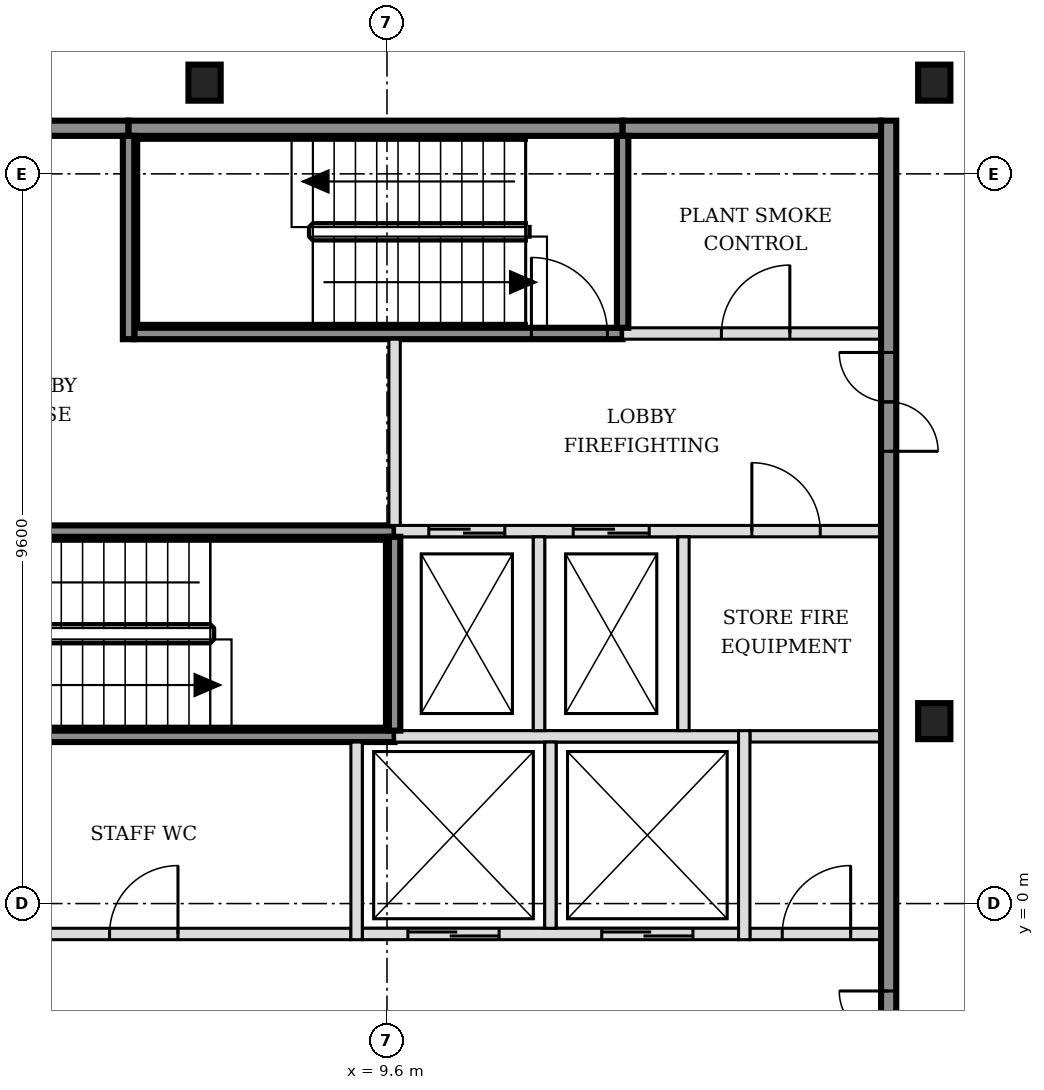
"""IFC4 building model, lengths in metres.
Left out: names, types, materials, properties, quantities, classifications, styles, units other than length and angle.
Written with IfcOpenShell. Run it as: python <this file> out.ifc"""

import sys

from ifc_helpers import new_model, si_unit, direction, frame, frame_2d, origin, origin_2d, place, context, subcontext, project, spatial, rectangle, i_section, extrude, element, fill, save


model = new_model("IFC4")
c1 = context("Model", 3, precision=1e-05, world=origin(), true_north=direction((0.0, 1.0)))
c2 = subcontext(c1, "Body", "Model", "MODEL_VIEW")
j1 = project(units=[si_unit("LENGTHUNIT", "METRE"), si_unit("PLANEANGLEUNIT", "RADIAN")], contexts=[c1])
p1 = place(None, origin())
s1 = spatial("IfcSite", under=j1, at=p1, CompositionType="ELEMENT")
p2 = place(p1, origin())
s2 = spatial("IfcBuilding", under=s1, at=p2, CompositionType="ELEMENT")
p3 = place(p2, frame((0.0, 0.0, 136.2)))
s3 = spatial("IfcBuildingStorey", under=s2, at=p3, CompositionType="ELEMENT", Elevation=136.2)
for number, where, z_axis, x_axis in (
    (1, (16.8, 2.4, -0.15), (0.0, 0.0, 1.0), (1.0, 0.0, 0.0)),
    (2, (7.2, 10.8, -0.15), (0.0, 0.0, 1.0), (1.0, 0.0, 0.0)),
    (3, (16.8, 10.8, -0.15), (0.0, 0.0, 1.0), (1.0, 0.0, 0.0)),
):
    element("IfcColumn", number, at=place(p3, frame(where, z_axis=z_axis, x_axis=x_axis)), inside=s3, PredefinedType="COLUMN", context=c2, shape_type="SweptSolid", body=[
        extrude(i_section(OverallWidth=0.424, OverallDepth=0.474, WebThickness=0.048, FlangeThickness=0.077, FilletRadius=0.015, at=origin_2d()), origin(), (0.0, 0.0, 1.0), 3.6),
    ])
p4 = place(p3, frame((-1.7, -0.4, 0.0), z_axis=(0.0, 0.0, 1.0), x_axis=(1.0, 0.0, 0.0)))
e4 = element("IfcWall", 4, at=p4, inside=s3, PredefinedType="PARTITIONING", context=c2, shape_type="SweptSolid", body=[
    extrude(rectangle(XDim=10.825, YDim=0.15, at=frame_2d((5.413, 0.0))), origin(), (0.0, 0.0, 1.0), 3.45),
])
p5 = place(p4, frame((2.15, 0.0, 0.0)))
e5 = element("IfcOpeningElement", 5, at=p5, cuts=e4, PredefinedType="OPENING", context=c2, shape_type="SweptSolid", body=[
    extrude(rectangle(XDim=0.9, YDim=2.1, at=frame_2d((0.45, 1.05))), frame((0.0, 0.085, 0.0), z_axis=(0.0, -1.0, 0.0), x_axis=(1.0, 0.0, 0.0)), (0.0, 0.0, 1.0), 0.17),
])
p6 = place(p4, frame((7.65, 0.0, 0.0)))
e6 = element("IfcOpeningElement", 6, at=p6, cuts=e4, PredefinedType="OPENING", context=c2, shape_type="SweptSolid", body=[
    extrude(rectangle(XDim=0.9, YDim=2.1, at=frame_2d((0.45, 1.05))), frame((0.0, 0.085, 0.0), z_axis=(0.0, -1.0, 0.0), x_axis=(1.0, 0.0, 0.0)), (0.0, 0.0, 1.0), 0.17),
])
p7 = place(p3, frame((9.275, -0.4, 0.0), z_axis=(0.0, 0.0, 1.0), x_axis=(1.0, 0.0, 0.0)))
e7 = element("IfcWall", 7, at=p7, inside=s3, PredefinedType="SOLIDWALL", context=c2, shape_type="SweptSolid", body=[
    extrude(rectangle(XDim=4.95, YDim=0.15, at=frame_2d((2.475, 0.0))), origin(), (0.0, 0.0, 1.0), 3.45),
])
p8 = place(p7, frame((0.6, 0.0, 0.0)))
e8 = element("IfcOpeningElement", 8, at=p8, cuts=e7, PredefinedType="OPENING", context=c2, shape_type="SweptSolid", body=[
    extrude(rectangle(XDim=1.2, YDim=2.1, at=frame_2d((0.6, 1.05))), frame((0.0, 0.085, 0.0), z_axis=(0.0, -1.0, 0.0), x_axis=(1.0, 0.0, 0.0)), (0.0, 0.0, 1.0), 0.17),
])
p9 = place(p7, frame((3.15, 0.0, 0.0)))
e9 = element("IfcOpeningElement", 9, at=p9, cuts=e7, PredefinedType="OPENING", context=c2, shape_type="SweptSolid", body=[
    extrude(rectangle(XDim=1.2, YDim=2.1, at=frame_2d((0.6, 1.05))), frame((0.0, 0.085, 0.0), z_axis=(0.0, -1.0, 0.0), x_axis=(1.0, 0.0, 0.0)), (0.0, 0.0, 1.0), 0.17),
])
p10 = place(p3, frame((14.375, -0.4, 0.0), z_axis=(0.0, 0.0, 1.0), x_axis=(1.0, 0.0, 0.0)))
e10 = element("IfcWall", 10, at=p10, inside=s3, PredefinedType="PARTITIONING", context=c2, shape_type="SweptSolid", body=[
    extrude(rectangle(XDim=1.725, YDim=0.15, at=frame_2d((0.863, 0.0))), origin(), (0.0, 0.0, 1.0), 3.45),
])
p11 = place(p10, frame((0.425, 0.0, 0.0)))
e11 = element("IfcOpeningElement", 11, at=p11, cuts=e10, PredefinedType="OPENING", context=c2, shape_type="SweptSolid", body=[
    extrude(rectangle(XDim=0.9, YDim=2.1, at=frame_2d((0.45, 1.05))), frame((0.0, 0.085, 0.0), z_axis=(0.0, -1.0, 0.0), x_axis=(1.0, 0.0, 0.0)), (0.0, 0.0, 1.0), 0.17),
])
p12 = place(p3, frame((3.2, 2.2, 0.0), z_axis=(0.0, 0.0, 1.0), x_axis=(1.0, 0.0, 0.0)))
e12 = element("IfcWall", 12, at=p12, inside=s3, PredefinedType="SOLIDWALL", context=c2, shape_type="SweptSolid", body=[
    extrude(rectangle(XDim=6.5, YDim=0.15, at=frame_2d((3.25, 0.0))), origin(), (0.0, 0.0, 1.0), 3.45),
])
p13 = place(p3, frame((9.7, 2.2, 0.0), z_axis=(0.0, 0.0, 1.0), x_axis=(1.0, 0.0, 0.0)))
e13 = element("IfcWall", 13, at=p13, inside=s3, PredefinedType="SOLIDWALL", context=c2, shape_type="SweptSolid", body=[
    extrude(rectangle(XDim=4.525, YDim=0.15, at=frame_2d((2.263, 0.0))), origin(), (0.0, 0.0, 1.0), 3.45),
])
p14 = place(p3, frame((14.375, 2.2, 0.0), z_axis=(0.0, 0.0, 1.0), x_axis=(1.0, 0.0, 0.0)))
e14 = element("IfcWall", 14, at=p14, inside=s3, PredefinedType="PARTITIONING", context=c2, shape_type="SweptSolid", body=[
    extrude(rectangle(XDim=1.725, YDim=0.15, at=frame_2d((0.863, 0.0))), origin(), (0.0, 0.0, 1.0), 3.45),
])
p15 = place(p3, frame((3.2, 4.9, 0.0), z_axis=(0.0, 0.0, 1.0), x_axis=(1.0, 0.0, 0.0)))
e15 = element("IfcWall", 15, at=p15, inside=s3, PredefinedType="SOLIDWALL", context=c2, shape_type="SweptSolid", body=[
    extrude(rectangle(XDim=6.5, YDim=0.15, at=frame_2d((3.25, 0.0))), origin(), (0.0, 0.0, 1.0), 3.45),
])
p16 = place(p15, frame((0.175, 0.0, 0.0)))
e16 = element("IfcOpeningElement", 16, at=p16, cuts=e15, PredefinedType="OPENING", context=c2, shape_type="SweptSolid", body=[
    extrude(rectangle(XDim=1.0, YDim=2.1, at=frame_2d((0.5, 1.05))), frame((0.0, 0.085, 0.0), z_axis=(0.0, -1.0, 0.0), x_axis=(1.0, 0.0, 0.0)), (0.0, 0.0, 1.0), 0.17),
])
p17 = place(p3, frame((9.7, 4.9, 0.0), z_axis=(0.0, 0.0, 1.0), x_axis=(1.0, 0.0, 0.0)))
e17 = element("IfcWall", 17, at=p17, inside=s3, PredefinedType="SOLIDWALL", context=c2, shape_type="SweptSolid", body=[
    extrude(rectangle(XDim=6.4, YDim=0.15, at=frame_2d((3.2, 0.0))), origin(), (0.0, 0.0, 1.0), 3.45),
])
p18 = place(p17, frame((0.45, 0.0, 0.0)))
e18 = element("IfcOpeningElement", 18, at=p18, cuts=e17, PredefinedType="OPENING", context=c2, shape_type="SweptSolid", body=[
    extrude(rectangle(XDim=1.0, YDim=2.1, at=frame_2d((0.5, 1.05))), frame((0.0, 0.085, 0.0), z_axis=(0.0, -1.0, 0.0), x_axis=(1.0, 0.0, 0.0)), (0.0, 0.0, 1.0), 0.17),
])
p19 = place(p17, frame((2.35, 0.0, 0.0)))
e19 = element("IfcOpeningElement", 19, at=p19, cuts=e17, PredefinedType="OPENING", context=c2, shape_type="SweptSolid", body=[
    extrude(rectangle(XDim=1.0, YDim=2.1, at=frame_2d((0.5, 1.05))), frame((0.0, 0.085, 0.0), z_axis=(0.0, -1.0, 0.0), x_axis=(1.0, 0.0, 0.0)), (0.0, 0.0, 1.0), 0.17),
])
p20 = place(p17, frame((4.7, 0.0, 0.0)))
e20 = element("IfcOpeningElement", 20, at=p20, cuts=e17, PredefinedType="OPENING", context=c2, shape_type="SweptSolid", body=[
    extrude(rectangle(XDim=0.9, YDim=2.1, at=frame_2d((0.45, 1.05))), frame((0.0, 0.085, 0.0), z_axis=(0.0, -1.0, 0.0), x_axis=(1.0, 0.0, 0.0)), (0.0, 0.0, 1.0), 0.17),
])
p21 = place(p3, frame((6.275, 7.5, 0.0), z_axis=(0.0, 0.0, 1.0), x_axis=(1.0, 0.0, 0.0)))
e21 = element("IfcWall", 21, at=p21, inside=s3, PredefinedType="SOLIDWALL", context=c2, shape_type="SweptSolid", body=[
    extrude(rectangle(XDim=6.425, YDim=0.15, at=frame_2d((3.212, 0.0))), origin(), (0.0, 0.0, 1.0), 3.45),
])
p22 = place(p21, frame((5.225, 0.0, 0.0)))
e22 = element("IfcOpeningElement", 22, at=p22, cuts=e21, PredefinedType="OPENING", context=c2, shape_type="SweptSolid", body=[
    extrude(rectangle(XDim=1.0, YDim=2.1, at=frame_2d((0.5, 1.05))), frame((0.0, 0.085, 0.0), z_axis=(0.0, -1.0, 0.0), x_axis=(1.0, 0.0, 0.0)), (0.0, 0.0, 1.0), 0.17),
])
p23 = place(p3, frame((12.7, 7.5, 0.0), z_axis=(0.0, 0.0, 1.0), x_axis=(1.0, 0.0, 0.0)))
e23 = element("IfcWall", 23, at=p23, inside=s3, PredefinedType="SOLIDWALL", context=c2, shape_type="SweptSolid", body=[
    extrude(rectangle(XDim=3.4, YDim=0.15, at=frame_2d((1.7, 0.0))), origin(), (0.0, 0.0, 1.0), 3.45),
])
p24 = place(p23, frame((1.3, 0.0, 0.0)))
e24 = element("IfcOpeningElement", 24, at=p24, cuts=e23, PredefinedType="OPENING", context=c2, shape_type="SweptSolid", body=[
    extrude(rectangle(XDim=0.9, YDim=2.1, at=frame_2d((0.45, 1.05))), frame((0.0, 0.085, 0.0), z_axis=(0.0, -1.0, 0.0), x_axis=(1.0, 0.0, 0.0)), (0.0, 0.0, 1.0), 0.17),
])
p25 = place(p3, frame((-1.7, 10.2, 0.0), z_axis=(0.0, 0.0, 1.0), x_axis=(1.0, 0.0, 0.0)))
e25 = element("IfcWall", 25, at=p25, inside=s3, PredefinedType="SOLIDWALL", context=c2, shape_type="SweptSolid", body=[
    extrude(rectangle(XDim=7.9, YDim=0.2, at=frame_2d((3.95, 0.0))), origin(), (0.0, 0.0, 1.0), 3.45),
])
p26 = place(p3, frame((6.2, 10.2, 0.0), z_axis=(0.0, 0.0, 1.0), x_axis=(1.0, 0.0, 0.0)))
e26 = element("IfcWall", 26, at=p26, inside=s3, PredefinedType="SOLIDWALL", context=c2, shape_type="SweptSolid", body=[
    extrude(rectangle(XDim=6.5, YDim=0.2, at=frame_2d((3.25, 0.0))), origin(), (0.0, 0.0, 1.0), 3.45),
])
p27 = place(p3, frame((12.7, 10.2, 0.0), z_axis=(0.0, 0.0, 1.0), x_axis=(1.0, 0.0, 0.0)))
e27 = element("IfcWall", 27, at=p27, inside=s3, PredefinedType="SOLIDWALL", context=c2, shape_type="SweptSolid", body=[
    extrude(rectangle(XDim=3.4, YDim=0.2, at=frame_2d((1.7, 0.0))), origin(), (0.0, 0.0, 1.0), 3.45),
])
p28 = place(p3, frame((6.2, 7.425, 0.0), z_axis=(0.0, 0.0, 1.0), x_axis=(0.0, 1.0, 0.0)))
e28 = element("IfcWall", 28, at=p28, inside=s3, PredefinedType="SOLIDWALL", context=c2, shape_type="SweptSolid", body=[
    extrude(rectangle(XDim=2.675, YDim=0.15, at=frame_2d((1.337, 0.0))), origin(), (0.0, 0.0, 1.0), 3.45),
])
p29 = place(p3, frame((9.2, -0.475, 0.0), z_axis=(0.0, 0.0, 1.0), x_axis=(0.0, 1.0, 0.0)))
e29 = element("IfcWall", 29, at=p29, inside=s3, PredefinedType="SOLIDWALL", context=c2, shape_type="SweptSolid", body=[
    extrude(rectangle(XDim=2.6, YDim=0.15, at=frame_2d((1.3, 0.0))), origin(), (0.0, 0.0, 1.0), 3.45),
])
p30 = place(p3, frame((9.7, 2.275, 0.0), z_axis=(0.0, 0.0, 1.0), x_axis=(0.0, 1.0, 0.0)))
e30 = element("IfcWall", 30, at=p30, inside=s3, PredefinedType="SOLIDWALL", context=c2, shape_type="SweptSolid", body=[
    extrude(rectangle(XDim=2.55, YDim=0.15, at=frame_2d((1.275, 0.0))), origin(), (0.0, 0.0, 1.0), 3.45),
])
p31 = place(p3, frame((9.7, 4.975, 0.0), z_axis=(0.0, 0.0, 1.0), x_axis=(0.0, 1.0, 0.0)))
e31 = element("IfcWall", 31, at=p31, inside=s3, PredefinedType="SOLIDWALL", context=c2, shape_type="SweptSolid", body=[
    extrude(rectangle(XDim=2.45, YDim=0.15, at=frame_2d((1.225, 0.0))), origin(), (0.0, 0.0, 1.0), 3.45),
])
p32 = place(p3, frame((11.6, 2.275, 0.0), z_axis=(0.0, 0.0, 1.0), x_axis=(0.0, 1.0, 0.0)))
e32 = element("IfcWall", 32, at=p32, inside=s3, PredefinedType="SOLIDWALL", context=c2, shape_type="SweptSolid", body=[
    extrude(rectangle(XDim=2.55, YDim=0.15, at=frame_2d((1.275, 0.0))), origin(), (0.0, 0.0, 1.0), 3.45),
])
p33 = place(p3, frame((11.75, -0.325, 0.0), z_axis=(0.0, 0.0, 1.0), x_axis=(0.0, 1.0, 0.0)))
e33 = element("IfcWall", 33, at=p33, inside=s3, PredefinedType="SOLIDWALL", context=c2, shape_type="SweptSolid", body=[
    extrude(rectangle(XDim=2.45, YDim=0.15, at=frame_2d((1.225, 0.0))), origin(), (0.0, 0.0, 1.0), 3.45),
])
p34 = place(p3, frame((12.7, 7.575, 0.0), z_axis=(0.0, 0.0, 1.0), x_axis=(0.0, 1.0, 0.0)))
e34 = element("IfcWall", 34, at=p34, inside=s3, PredefinedType="SOLIDWALL", context=c2, shape_type="SweptSolid", body=[
    extrude(rectangle(XDim=2.525, YDim=0.15, at=frame_2d((1.263, 0.0))), origin(), (0.0, 0.0, 1.0), 3.45),
])
p35 = place(p3, frame((13.5, 2.275, 0.0), z_axis=(0.0, 0.0, 1.0), x_axis=(0.0, 1.0, 0.0)))
e35 = element("IfcWall", 35, at=p35, inside=s3, PredefinedType="SOLIDWALL", context=c2, shape_type="SweptSolid", body=[
    extrude(rectangle(XDim=2.55, YDim=0.15, at=frame_2d((1.275, 0.0))), origin(), (0.0, 0.0, 1.0), 3.45),
])
p36 = place(p3, frame((14.3, -0.475, 0.0), z_axis=(0.0, 0.0, 1.0), x_axis=(0.0, 1.0, 0.0)))
e36 = element("IfcWall", 36, at=p36, inside=s3, PredefinedType="SOLIDWALL", context=c2, shape_type="SweptSolid", body=[
    extrude(rectangle(XDim=2.75, YDim=0.15, at=frame_2d((1.375, 0.0))), origin(), (0.0, 0.0, 1.0), 3.45),
])
p37 = place(p3, frame((16.2, -5.5, 0.0), z_axis=(0.0, 0.0, 1.0), x_axis=(0.0, 1.0, 0.0)))
e37 = element("IfcWall", 37, at=p37, inside=s3, PredefinedType="SOLIDWALL", context=c2, shape_type="SweptSolid", body=[
    extrude(rectangle(XDim=15.8, YDim=0.2, at=frame_2d((7.9, 0.0))), origin(), (0.0, 0.0, 1.0), 3.45),
])
p38 = place(p37, frame((3.05, 0.0, 0.0)))
e38 = element("IfcOpeningElement", 38, at=p38, cuts=e37, PredefinedType="OPENING", context=c2, shape_type="SweptSolid", body=[
    extrude(rectangle(XDim=1.3, YDim=2.1, at=frame_2d((0.65, 1.05))), frame((0.0, 0.11, 0.0), z_axis=(0.0, -1.0, 0.0), x_axis=(1.0, 0.0, 0.0)), (0.0, 0.0, 1.0), 0.22),
])
p39 = place(p37, frame((11.45, 0.0, 0.0)))
e39 = element("IfcOpeningElement", 39, at=p39, cuts=e37, PredefinedType="OPENING", context=c2, shape_type="SweptSolid", body=[
    extrude(rectangle(XDim=1.3, YDim=2.1, at=frame_2d((0.65, 1.05))), frame((0.0, 0.11, 0.0), z_axis=(0.0, -1.0, 0.0), x_axis=(1.0, 0.0, 0.0)), (0.0, 0.0, 1.0), 0.22),
])
p40 = place(p8, origin())
e40 = element("IfcDoor", 40, at=p40, inside=s3, OperationType="DOUBLE_DOOR_SLIDING", PredefinedType="DOOR", context=c2, shape_type="SweptSolid", body=[
    extrude(rectangle(XDim=1.2, YDim=2.1, at=frame_2d((0.6, 1.05))), frame((0.0, 0.025, 0.0), z_axis=(0.0, -1.0, 0.0), x_axis=(1.0, 0.0, 0.0)), (0.0, 0.0, 1.0), 0.05),
])
fill(e8, e40)
p41 = place(p9, origin())
e41 = element("IfcDoor", 41, at=p41, inside=s3, OperationType="DOUBLE_DOOR_SLIDING", PredefinedType="DOOR", context=c2, shape_type="SweptSolid", body=[
    extrude(rectangle(XDim=1.2, YDim=2.1, at=frame_2d((0.6, 1.05))), frame((0.0, 0.025, 0.0), z_axis=(0.0, -1.0, 0.0), x_axis=(1.0, 0.0, 0.0)), (0.0, 0.0, 1.0), 0.05),
])
fill(e9, e41)
p42 = place(p18, origin())
e42 = element("IfcDoor", 42, at=p42, inside=s3, OperationType="DOUBLE_DOOR_SLIDING", PredefinedType="DOOR", context=c2, shape_type="SweptSolid", body=[
    extrude(rectangle(XDim=1.0, YDim=2.1, at=frame_2d((0.5, 1.05))), frame((0.0, 0.025, 0.0), z_axis=(0.0, -1.0, 0.0), x_axis=(1.0, 0.0, 0.0)), (0.0, 0.0, 1.0), 0.05),
])
fill(e18, e42)
p43 = place(p19, origin())
e43 = element("IfcDoor", 43, at=p43, inside=s3, OperationType="DOUBLE_DOOR_SLIDING", PredefinedType="DOOR", context=c2, shape_type="SweptSolid", body=[
    extrude(rectangle(XDim=1.0, YDim=2.1, at=frame_2d((0.5, 1.05))), frame((0.0, 0.025, 0.0), z_axis=(0.0, -1.0, 0.0), x_axis=(1.0, 0.0, 0.0)), (0.0, 0.0, 1.0), 0.05),
])
fill(e19, e43)
p44 = place(p22, origin())
e44 = element("IfcDoor", 44, at=p44, inside=s3, OperationType="SINGLE_SWING_LEFT", PredefinedType="DOOR", context=c2, shape_type="SweptSolid", body=[
    extrude(rectangle(XDim=1.0, YDim=2.1, at=frame_2d((0.5, 1.05))), frame((0.0, 0.025, 0.0), z_axis=(0.0, -1.0, 0.0), x_axis=(1.0, 0.0, 0.0)), (0.0, 0.0, 1.0), 0.05),
])
fill(e22, e44)
p45 = place(p38, origin())
e45 = element("IfcDoor", 45, at=p45, inside=s3, OperationType="DOUBLE_DOOR_SINGLE_SWING", PredefinedType="DOOR", context=c2, shape_type="SweptSolid", body=[
    extrude(rectangle(XDim=1.3, YDim=2.1, at=frame_2d((0.65, 1.05))), frame((0.0, 0.025, 0.0), z_axis=(0.0, -1.0, 0.0), x_axis=(1.0, 0.0, 0.0)), (0.0, 0.0, 1.0), 0.05),
])
fill(e38, e45)
p46 = place(p39, origin())
e46 = element("IfcDoor", 46, at=p46, inside=s3, OperationType="DOUBLE_DOOR_SINGLE_SWING", PredefinedType="DOOR", context=c2, shape_type="SweptSolid", body=[
    extrude(rectangle(XDim=1.3, YDim=2.1, at=frame_2d((0.65, 1.05))), frame((0.0, 0.025, 0.0), z_axis=(0.0, -1.0, 0.0), x_axis=(1.0, 0.0, 0.0)), (0.0, 0.0, 1.0), 0.05),
])
fill(e39, e46)
p47 = place(p11, origin())
e47 = element("IfcDoor", 47, at=p47, inside=s3, OperationType="SINGLE_SWING_RIGHT", PredefinedType="DOOR", context=c2, shape_type="SweptSolid", body=[
    extrude(rectangle(XDim=0.9, YDim=2.1, at=frame_2d((0.45, 1.05))), frame((0.0, 0.025, 0.0), z_axis=(0.0, -1.0, 0.0), x_axis=(1.0, 0.0, 0.0)), (0.0, 0.0, 1.0), 0.05),
])
fill(e11, e47)
p48 = place(p20, origin())
e48 = element("IfcDoor", 48, at=p48, inside=s3, OperationType="SINGLE_SWING_LEFT", PredefinedType="DOOR", context=c2, shape_type="SweptSolid", body=[
    extrude(rectangle(XDim=0.9, YDim=2.1, at=frame_2d((0.45, 1.05))), frame((0.0, 0.025, 0.0), z_axis=(0.0, -1.0, 0.0), x_axis=(1.0, 0.0, 0.0)), (0.0, 0.0, 1.0), 0.05),
])
fill(e20, e48)
p49 = place(p24, origin())
e49 = element("IfcDoor", 49, at=p49, inside=s3, OperationType="SINGLE_SWING_RIGHT", PredefinedType="DOOR", context=c2, shape_type="SweptSolid", body=[
    extrude(rectangle(XDim=0.9, YDim=2.1, at=frame_2d((0.45, 1.05))), frame((0.0, 0.025, 0.0), z_axis=(0.0, -1.0, 0.0), x_axis=(1.0, 0.0, 0.0)), (0.0, 0.0, 1.0), 0.05),
])
fill(e24, e49)
p50 = place(p6, origin())
e50 = element("IfcDoor", 50, at=p50, inside=s3, OperationType="SINGLE_SWING_RIGHT", PredefinedType="DOOR", context=c2, shape_type="SweptSolid", body=[
    extrude(rectangle(XDim=0.9, YDim=2.1, at=frame_2d((0.45, 1.05))), frame((0.0, 0.025, 0.0), z_axis=(0.0, -1.0, 0.0), x_axis=(1.0, 0.0, 0.0)), (0.0, 0.0, 1.0), 0.05),
])
fill(e6, e50)
save(model, sys.argv[1])
